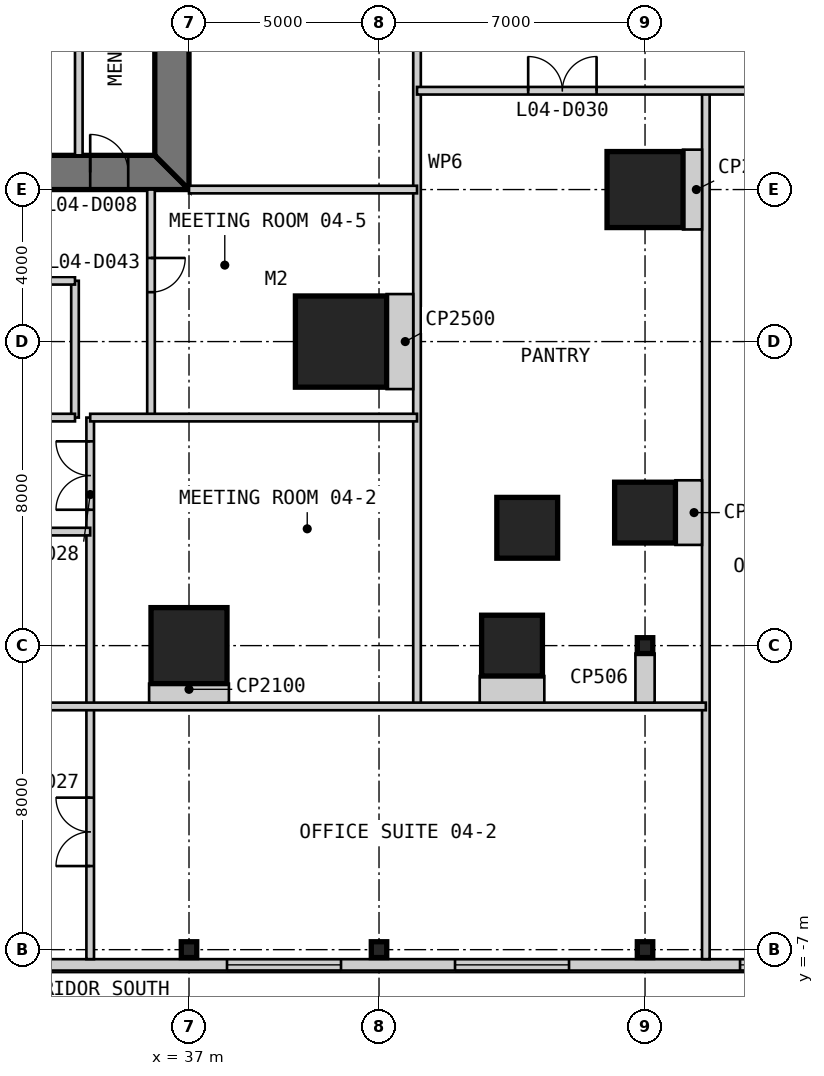
"""IFC4 building model, lengths in metres.
Left out: names, types, materials, properties, quantities, classifications, styles, units other than length and angle.
Written with IfcOpenShell. Run it as: python <this file> out.ifc"""

import sys

from ifc_helpers import new_model, si_unit, direction, frame, frame_2d, origin, origin_2d, place, context, subcontext, project, spatial, polyline, rectangle, i_section, outline, extrude, element, fill, save


model = new_model("IFC4")
c1 = context("Model", 3, precision=1e-05, world=origin(), true_north=direction((0.0, 1.0)))
c2 = subcontext(c1, "Body", "Model", "MODEL_VIEW")
j1 = project(units=[si_unit("LENGTHUNIT", "METRE"), si_unit("PLANEANGLEUNIT", "RADIAN")], contexts=[c1])
p1 = place(None, origin())
s1 = spatial("IfcSite", under=j1, at=p1, CompositionType="ELEMENT")
p2 = place(p1, origin())
s2 = spatial("IfcBuilding", under=s1, at=p2, CompositionType="ELEMENT")
p3 = place(p2, frame((0.0, 0.0, 21.4)))
s3 = spatial("IfcBuildingStorey", under=s2, at=p3, CompositionType="ELEMENT", Elevation=21.4)
p4 = place(p3, frame((41.0, 9.0, 0.0), z_axis=(0.0, 0.0, 1.0), x_axis=(1.0, 0.0, 0.0)))
e1 = element("IfcColumn", 1, at=p4, inside=s3, PredefinedType="COLUMN", context=c2, shape_type="SweptSolid", body=[
    extrude(rectangle(XDim=2.4, YDim=2.4, at=origin_2d()), origin(), (0.0, 0.0, 1.0), 4.8),
])
p5 = place(p3, frame((37.0, 1.0, 0.0), z_axis=(0.0, 0.0, 1.0), x_axis=(1.0, 0.0, 0.0)))
e2 = element("IfcColumn", 2, at=p5, inside=s3, PredefinedType="COLUMN", context=c2, shape_type="SweptSolid", body=[
    extrude(rectangle(XDim=2.0, YDim=2.0, at=origin_2d()), origin(), (0.0, 0.0, 1.0), 4.8),
])
for number, where, z_axis, x_axis in (
    (3, (45.5, 1.0, 0.0), (0.0, 0.0, 1.0), (1.0, 0.0, 0.0)),
    (4, (45.9, 4.1, 0.0), (0.0, 0.0, 1.0), (1.0, 0.0, 0.0)),
    (5, (49.0, 4.5, 0.0), (0.0, 0.0, 1.0), (1.0, 0.0, 0.0)),
):
    element("IfcColumn", number, at=place(p3, frame(where, z_axis=z_axis, x_axis=x_axis)), inside=s3, PredefinedType="COLUMN", context=c2, shape_type="SweptSolid", body=[
        extrude(rectangle(XDim=1.6, YDim=1.6, at=origin_2d()), origin(), (0.0, 0.0, 1.0), 4.8),
    ])
p6 = place(p3, frame((49.0, 13.0, 0.0), z_axis=(0.0, 0.0, 1.0), x_axis=(1.0, 0.0, 0.0)))
e6 = element("IfcColumn", 6, at=p6, inside=s3, PredefinedType="COLUMN", context=c2, shape_type="SweptSolid", body=[
    extrude(rectangle(XDim=2.0, YDim=2.0, at=origin_2d()), origin(), (0.0, 0.0, 1.0), 4.8),
])
for number, where, z_axis, x_axis in (
    (7, (37.0, -7.0, 0.0), (0.0, 0.0, 1.0), (1.0, 0.0, 0.0)),
    (8, (42.0, -7.0, 0.0), (0.0, 0.0, 1.0), (1.0, 0.0, 0.0)),
    (9, (49.0, -7.0, 0.0), (0.0, 0.0, 1.0), (1.0, 0.0, 0.0)),
    (10, (49.0, 1.0, 0.0), (0.0, 0.0, 1.0), (1.0, 0.0, 0.0)),
):
    element("IfcColumn", number, at=place(p3, frame(where, z_axis=z_axis, x_axis=x_axis)), inside=s3, PredefinedType="COLUMN", context=c2, shape_type="SweptSolid", body=[
        extrude(i_section(OverallWidth=0.406, OverallDepth=0.417, WebThickness=0.03, FlangeThickness=0.048, at=origin_2d()), origin(), (0.0, 0.0, 1.0), 4.8),
    ])
p7 = place(p3, frame((13.0, 13.45, 0.0), z_axis=(0.0, 0.0, 1.0), x_axis=(1.0, 0.0, 0.0)))
e11 = element("IfcWall", 11, at=p7, inside=s3, PredefinedType="SHEAR", context=c2, shape_type="SweptSolid", body=[
    extrude(outline(polyline([(0.0, -0.45), (24.0, -0.45), (23.1, 0.45), (0.9, 0.45), (0.0, -0.45)])), origin(), (0.0, 0.0, 1.0), 4.8),
])
p8 = place(p7, frame((4.9, 0.0, 0.0)))
e12 = element("IfcOpeningElement", 12, at=p8, cuts=e11, PredefinedType="OPENING", context=c2, shape_type="SweptSolid", body=[
    extrude(rectangle(XDim=1.0, YDim=2.2, at=frame_2d((0.5, 1.1))), frame((0.0, 0.46, 0.0), z_axis=(0.0, -1.0, 0.0), x_axis=(1.0, 0.0, 0.0)), (0.0, 0.0, 1.0), 0.92),
])
p9 = place(p7, frame((8.9, 0.0, 0.0)))
e13 = element("IfcOpeningElement", 13, at=p9, cuts=e11, PredefinedType="OPENING", context=c2, shape_type="SweptSolid", body=[
    extrude(rectangle(XDim=1.1, YDim=2.2, at=frame_2d((0.55, 1.1))), frame((0.0, 0.46, 0.0), z_axis=(0.0, -1.0, 0.0), x_axis=(1.0, 0.0, 0.0)), (0.0, 0.0, 1.0), 0.92),
])
p10 = place(p7, frame((15.05, 0.0, 0.0)))
e14 = element("IfcOpeningElement", 14, at=p10, cuts=e11, PredefinedType="OPENING", context=c2, shape_type="SweptSolid", body=[
    extrude(rectangle(XDim=0.9, YDim=2.2, at=frame_2d((0.45, 1.1))), frame((0.0, 0.46, 0.0), z_axis=(0.0, -1.0, 0.0), x_axis=(1.0, 0.0, 0.0)), (0.0, 0.0, 1.0), 0.92),
])
p11 = place(p7, frame((17.9, 0.0, 0.0)))
e15 = element("IfcOpeningElement", 15, at=p11, cuts=e11, PredefinedType="OPENING", context=c2, shape_type="SweptSolid", body=[
    extrude(rectangle(XDim=1.0, YDim=2.2, at=frame_2d((0.5, 1.1))), frame((0.0, 0.46, 0.0), z_axis=(0.0, -1.0, 0.0), x_axis=(1.0, 0.0, 0.0)), (0.0, 0.0, 1.0), 0.92),
])
p12 = place(p7, frame((21.4, 0.0, 0.0)))
e16 = element("IfcOpeningElement", 16, at=p12, cuts=e11, PredefinedType="OPENING", context=c2, shape_type="SweptSolid", body=[
    extrude(rectangle(XDim=1.0, YDim=2.2, at=frame_2d((0.5, 1.1))), frame((0.0, 0.46, 0.0), z_axis=(0.0, -1.0, 0.0), x_axis=(1.0, 0.0, 0.0)), (0.0, 0.0, 1.0), 0.92),
])
p13 = place(p3, frame((36.55, 13.9, 0.0), z_axis=(0.0, 0.0, 1.0), x_axis=(0.0, 1.0, 0.0)))
e17 = element("IfcWall", 17, at=p13, inside=s3, PredefinedType="SHEAR", context=c2, shape_type="SweptSolid", body=[
    extrude(outline(polyline([(-0.9, -0.45), (23.1, -0.45), (22.2, 0.45), (0.0, 0.45), (-0.9, -0.45)])), origin(), (0.0, 0.0, 1.0), 4.8),
])
p14 = place(p13, frame((20.2, 0.0, 0.0)))
e18 = element("IfcOpeningElement", 18, at=p14, cuts=e17, PredefinedType="OPENING", context=c2, shape_type="SweptSolid", body=[
    extrude(rectangle(XDim=1.0, YDim=2.2, at=frame_2d((0.5, 1.1))), frame((0.0, 0.46, 0.0), z_axis=(0.0, -1.0, 0.0), x_axis=(1.0, 0.0, 0.0)), (0.0, 0.0, 1.0), 0.92),
])
p15 = place(p13, frame((17.25, 0.0, 0.0)))
e19 = element("IfcOpeningElement", 19, at=p15, cuts=e17, PredefinedType="OPENING", context=c2, shape_type="SweptSolid", body=[
    extrude(rectangle(XDim=0.9, YDim=2.2, at=frame_2d((0.45, 1.1))), frame((0.0, 0.46, 0.0), z_axis=(0.0, -1.0, 0.0), x_axis=(1.0, 0.0, 0.0)), (0.0, 0.0, 1.0), 0.92),
])
p16 = place(p3, frame((-7.55, -7.4, 0.0), z_axis=(0.0, 0.0, 1.0), x_axis=(1.0, 0.0, 0.0)))
e20 = element("IfcWall", 20, at=p16, inside=s3, PredefinedType="SOLIDWALL", context=c2, shape_type="SweptSolid", body=[
    extrude(rectangle(XDim=65.1, YDim=0.3, at=frame_2d((32.55, 0.0))), origin(), (0.0, 0.0, 1.0), 4.5),
])
p17 = place(p16, frame((3.05, 0.0, 0.9)))
e21 = element("IfcOpeningElement", 21, at=p17, cuts=e20, PredefinedType="OPENING", context=c2, shape_type="SweptSolid", body=[
    extrude(rectangle(XDim=3.0, YDim=2.4, at=frame_2d((1.5, 1.2))), frame((0.0, 0.16, 0.0), z_axis=(0.0, -1.0, 0.0), x_axis=(1.0, 0.0, 0.0)), (0.0, 0.0, 1.0), 0.32),
])
p18 = place(p16, frame((11.05, 0.0, 0.9)))
e22 = element("IfcOpeningElement", 22, at=p18, cuts=e20, PredefinedType="OPENING", context=c2, shape_type="SweptSolid", body=[
    extrude(rectangle(XDim=3.0, YDim=2.4, at=frame_2d((1.5, 1.2))), frame((0.0, 0.16, 0.0), z_axis=(0.0, -1.0, 0.0), x_axis=(1.0, 0.0, 0.0)), (0.0, 0.0, 1.0), 0.32),
])
p19 = place(p16, frame((25.05, 0.0, 0.9)))
e23 = element("IfcOpeningElement", 23, at=p19, cuts=e20, PredefinedType="OPENING", context=c2, shape_type="SweptSolid", body=[
    extrude(rectangle(XDim=3.0, YDim=2.4, at=frame_2d((1.5, 1.2))), frame((0.0, 0.16, 0.0), z_axis=(0.0, -1.0, 0.0), x_axis=(1.0, 0.0, 0.0)), (0.0, 0.0, 1.0), 0.32),
])
p20 = place(p16, frame((37.05, 0.0, 0.9)))
e24 = element("IfcOpeningElement", 24, at=p20, cuts=e20, PredefinedType="OPENING", context=c2, shape_type="SweptSolid", body=[
    extrude(rectangle(XDim=3.0, YDim=2.4, at=frame_2d((1.5, 1.2))), frame((0.0, 0.16, 0.0), z_axis=(0.0, -1.0, 0.0), x_axis=(1.0, 0.0, 0.0)), (0.0, 0.0, 1.0), 0.32),
])
p21 = place(p16, frame((45.55, 0.0, 0.9)))
e25 = element("IfcOpeningElement", 25, at=p21, cuts=e20, PredefinedType="OPENING", context=c2, shape_type="SweptSolid", body=[
    extrude(rectangle(XDim=3.0, YDim=2.4, at=frame_2d((1.5, 1.2))), frame((0.0, 0.16, 0.0), z_axis=(0.0, -1.0, 0.0), x_axis=(1.0, 0.0, 0.0)), (0.0, 0.0, 1.0), 0.32),
])
p22 = place(p16, frame((51.55, 0.0, 0.9)))
e26 = element("IfcOpeningElement", 26, at=p22, cuts=e20, PredefinedType="OPENING", context=c2, shape_type="SweptSolid", body=[
    extrude(rectangle(XDim=3.0, YDim=2.4, at=frame_2d((1.5, 1.2))), frame((0.0, 0.16, 0.0), z_axis=(0.0, -1.0, 0.0), x_axis=(1.0, 0.0, 0.0)), (0.0, 0.0, 1.0), 0.32),
])
p23 = place(p16, frame((59.05, 0.0, 0.9)))
e27 = element("IfcOpeningElement", 27, at=p23, cuts=e20, PredefinedType="OPENING", context=c2, shape_type="SweptSolid", body=[
    extrude(rectangle(XDim=3.0, YDim=2.4, at=frame_2d((1.5, 1.2))), frame((0.0, 0.16, 0.0), z_axis=(0.0, -1.0, 0.0), x_axis=(1.0, 0.0, 0.0)), (0.0, 0.0, 1.0), 0.32),
])
p24 = place(p3, frame((34.1, 13.9, 0.0), z_axis=(0.0, 0.0, 1.0), x_axis=(0.0, 1.0, 0.0)))
e28 = element("IfcWall", 28, at=p24, inside=s3, PredefinedType="PARTITIONING", context=c2, shape_type="SweptSolid", body=[
    extrude(rectangle(XDim=6.1, YDim=0.2, at=frame_2d((3.05, 0.0))), origin(), (0.0, 0.0, 1.0), 4.6),
])
p25 = place(p3, frame((34.0, 7.0, 0.0), z_axis=(0.0, 0.0, 1.0), x_axis=(0.0, 1.0, 0.0)))
e29 = element("IfcWall", 29, at=p25, inside=s3, PredefinedType="PARTITIONING", context=c2, shape_type="SweptSolid", body=[
    extrude(rectangle(XDim=3.6, YDim=0.2, at=frame_2d((1.8, 0.0))), origin(), (0.0, 0.0, 1.0), 3.843),
])
p26 = place(p3, frame((34.4, -7.25, 0.0), z_axis=(0.0, 0.0, 1.0), x_axis=(0.0, 1.0, 0.0)))
e30 = element("IfcWall", 30, at=p26, inside=s3, PredefinedType="PARTITIONING", context=c2, shape_type="SweptSolid", body=[
    extrude(rectangle(XDim=14.25, YDim=0.2, at=frame_2d((7.125, 0.0))), origin(), (0.0, 0.0, 1.0), 4.5),
])
p27 = place(p26, frame((2.45, 0.0, 0.0)))
e31 = element("IfcOpeningElement", 31, at=p27, cuts=e30, PredefinedType="OPENING", context=c2, shape_type="SweptSolid", body=[
    extrude(rectangle(XDim=1.8, YDim=2.4, at=frame_2d((0.9, 1.2))), frame((0.0, 0.11, 0.0), z_axis=(0.0, -1.0, 0.0), x_axis=(1.0, 0.0, 0.0)), (0.0, 0.0, 1.0), 0.22),
])
p28 = place(p26, frame((11.825, 0.0, 0.0)))
e32 = element("IfcOpeningElement", 32, at=p28, cuts=e30, PredefinedType="OPENING", context=c2, shape_type="SweptSolid", body=[
    extrude(rectangle(XDim=1.8, YDim=2.4, at=frame_2d((0.9, 1.2))), frame((0.0, 0.11, 0.0), z_axis=(0.0, -1.0, 0.0), x_axis=(1.0, 0.0, 0.0)), (0.0, 0.0, 1.0), 0.22),
])
p29 = place(p3, frame((36.0, 7.0, 0.0), z_axis=(0.0, 0.0, 1.0), x_axis=(0.0, 1.0, 0.0)))
e33 = element("IfcWall", 33, at=p29, inside=s3, PredefinedType="PARTITIONING", context=c2, shape_type="SweptSolid", body=[
    extrude(rectangle(XDim=6.0, YDim=0.2, at=frame_2d((3.0, 0.0))), origin(), (0.0, 0.0, 1.0), 4.5),
])
p30 = place(p29, frame((3.3, 0.0, 0.0)))
e34 = element("IfcOpeningElement", 34, at=p30, cuts=e33, PredefinedType="OPENING", context=c2, shape_type="SweptSolid", body=[
    extrude(rectangle(XDim=0.9, YDim=2.2, at=frame_2d((0.45, 1.1))), frame((0.0, 0.11, 0.0), z_axis=(0.0, -1.0, 0.0), x_axis=(1.0, 0.0, 0.0)), (0.0, 0.0, 1.0), 0.22),
])
p31 = place(p3, frame((43.0, -0.6, 0.0), z_axis=(0.0, 0.0, 1.0), x_axis=(0.0, 1.0, 0.0)))
e35 = element("IfcWall", 35, at=p31, inside=s3, PredefinedType="PARTITIONING", context=c2, shape_type="SweptSolid", body=[
    extrude(rectangle(XDim=28.6, YDim=0.2, at=frame_2d((14.3, 0.0))), origin(), (0.0, 0.0, 1.0), 3.843),
])
p32 = place(p3, frame((50.6, -7.25, 0.0), z_axis=(0.0, 0.0, 1.0), x_axis=(0.0, 1.0, 0.0)))
e36 = element("IfcWall", 36, at=p32, inside=s3, PredefinedType="PARTITIONING", context=c2, shape_type="SweptSolid", body=[
    extrude(rectangle(XDim=22.85, YDim=0.2, at=frame_2d((11.425, 0.0))), origin(), (0.0, 0.0, 1.0), 4.5),
])
p33 = place(p3, frame((26.4, -0.6, 0.0), z_axis=(0.0, 0.0, 1.0), x_axis=(1.0, 0.0, 0.0)))
e37 = element("IfcWall", 37, at=p33, inside=s3, PredefinedType="PARTITIONING", context=c2, shape_type="SweptSolid", body=[
    extrude(rectangle(XDim=24.2, YDim=0.2, at=frame_2d((12.1, 0.0))), origin(), (0.0, 0.0, 1.0), 4.5),
])
p34 = place(p3, frame((26.4, 4.0, 0.0), z_axis=(0.0, 0.0, 1.0), x_axis=(1.0, 0.0, 0.0)))
e38 = element("IfcWall", 38, at=p34, inside=s3, PredefinedType="PARTITIONING", context=c2, shape_type="SweptSolid", body=[
    extrude(rectangle(XDim=8.0, YDim=0.2, at=frame_2d((4.0, 0.0))), origin(), (0.0, 0.0, 1.0), 4.5),
])
p35 = place(p34, frame((3.55, 0.0, 0.0)))
e39 = element("IfcOpeningElement", 39, at=p35, cuts=e38, PredefinedType="OPENING", context=c2, shape_type="SweptSolid", body=[
    extrude(rectangle(XDim=0.9, YDim=2.2, at=frame_2d((0.45, 1.1))), frame((0.0, 0.11, 0.0), z_axis=(0.0, -1.0, 0.0), x_axis=(1.0, 0.0, 0.0)), (0.0, 0.0, 1.0), 0.22),
])
p36 = place(p3, frame((25.6, 7.0, 0.0), z_axis=(0.0, 0.0, 1.0), x_axis=(1.0, 0.0, 0.0)))
e40 = element("IfcWall", 40, at=p36, inside=s3, PredefinedType="PARTITIONING", context=c2, shape_type="SweptSolid", body=[
    extrude(rectangle(XDim=8.4, YDim=0.2, at=frame_2d((4.2, 0.0))), origin(), (0.0, 0.0, 1.0), 4.5),
])
p37 = place(p3, frame((34.4, 7.0, 0.0), z_axis=(0.0, 0.0, 1.0), x_axis=(1.0, 0.0, 0.0)))
e41 = element("IfcWall", 41, at=p37, inside=s3, PredefinedType="PARTITIONING", context=c2, shape_type="SweptSolid", body=[
    extrude(rectangle(XDim=8.6, YDim=0.2, at=frame_2d((4.3, 0.0))), origin(), (0.0, 0.0, 1.0), 4.5),
])
p38 = place(p3, frame((25.6, 10.6, 0.0), z_axis=(0.0, 0.0, 1.0), x_axis=(1.0, 0.0, 0.0)))
e42 = element("IfcWall", 42, at=p38, inside=s3, PredefinedType="PARTITIONING", context=c2, shape_type="SweptSolid", body=[
    extrude(rectangle(XDim=8.4, YDim=0.2, at=frame_2d((4.2, 0.0))), origin(), (0.0, 0.0, 1.0), 4.5),
])
p39 = place(p38, frame((3.75, 0.0, 0.0)))
e43 = element("IfcOpeningElement", 43, at=p39, cuts=e42, PredefinedType="OPENING", context=c2, shape_type="SweptSolid", body=[
    extrude(rectangle(XDim=0.9, YDim=2.2, at=frame_2d((0.45, 1.1))), frame((0.0, 0.11, 0.0), z_axis=(0.0, -1.0, 0.0), x_axis=(1.0, 0.0, 0.0)), (0.0, 0.0, 1.0), 0.22),
])
p40 = place(p3, frame((37.0, 13.0, 0.0), z_axis=(0.0, 0.0, 1.0), x_axis=(1.0, 0.0, 0.0)))
e44 = element("IfcWall", 44, at=p40, inside=s3, PredefinedType="PARTITIONING", context=c2, shape_type="SweptSolid", body=[
    extrude(rectangle(XDim=6.0, YDim=0.2, at=frame_2d((3.0, 0.0))), origin(), (0.0, 0.0, 1.0), 3.653),
])
p41 = place(p3, frame((43.0, 15.6, 0.0), z_axis=(0.0, 0.0, 1.0), x_axis=(1.0, 0.0, 0.0)))
e45 = element("IfcWall", 45, at=p41, inside=s3, PredefinedType="PARTITIONING", context=c2, shape_type="SweptSolid", body=[
    extrude(rectangle(XDim=14.25, YDim=0.2, at=frame_2d((7.125, 0.0))), origin(), (0.0, 0.0, 1.0), 4.5),
])
p42 = place(p41, frame((10.0, 0.0, 0.0)))
e46 = element("IfcOpeningElement", 46, at=p42, cuts=e45, PredefinedType="OPENING", context=c2, shape_type="SweptSolid", body=[
    extrude(rectangle(XDim=1.8, YDim=2.4, at=frame_2d((0.9, 1.2))), frame((0.0, 0.11, 0.0), z_axis=(0.0, -1.0, 0.0), x_axis=(1.0, 0.0, 0.0)), (0.0, 0.0, 1.0), 0.22),
])
p43 = place(p41, frame((2.925, 0.0, 0.0)))
e47 = element("IfcOpeningElement", 47, at=p43, cuts=e45, PredefinedType="OPENING", context=c2, shape_type="SweptSolid", body=[
    extrude(rectangle(XDim=1.8, YDim=2.4, at=frame_2d((0.9, 1.2))), frame((0.0, 0.11, 0.0), z_axis=(0.0, -1.0, 0.0), x_axis=(1.0, 0.0, 0.0)), (0.0, 0.0, 1.0), 0.22),
])
p44 = place(p3, frame((37.0, -0.5, 0.0), z_axis=(0.0, 0.0, 1.0), x_axis=(0.0, 1.0, 0.0)))
e48 = element("IfcWall", 48, at=p44, inside=s3, PredefinedType="PARTITIONING", context=c2, shape_type="SweptSolid", body=[
    extrude(rectangle(XDim=0.5, YDim=2.1, at=frame_2d((0.25, 0.0))), origin(), (0.0, 0.0, 1.0), 4.5),
])
for number, where, z_axis, x_axis in (
    (49, (45.5, -0.5, 0.0), (0.0, 0.0, 1.0), (0.0, 1.0, 0.0)),
    (50, (50.5, 4.5, 0.0), (0.0, 0.0, 1.0), (-1.0, 0.0, 0.0)),
):
    element("IfcWall", number, at=place(p3, frame(where, z_axis=z_axis, x_axis=x_axis)), inside=s3, PredefinedType="PARTITIONING", context=c2, shape_type="SweptSolid", body=[
        extrude(rectangle(XDim=0.7, YDim=1.7, at=frame_2d((0.35, 0.0))), origin(), (0.0, 0.0, 1.0), 4.5),
    ])
p45 = place(p3, frame((50.5, 13.0, 0.0), z_axis=(0.0, 0.0, 1.0), x_axis=(-1.0, 0.0, 0.0)))
e51 = element("IfcWall", 51, at=p45, inside=s3, PredefinedType="PARTITIONING", context=c2, shape_type="SweptSolid", body=[
    extrude(rectangle(XDim=0.5, YDim=2.1, at=frame_2d((0.25, 0.0))), origin(), (0.0, 0.0, 1.0), 4.5),
])
p46 = place(p3, frame((49.0, -0.5, 0.0), z_axis=(0.0, 0.0, 1.0), x_axis=(0.0, 1.0, 0.0)))
e52 = element("IfcWall", 52, at=p46, inside=s3, PredefinedType="PARTITIONING", context=c2, shape_type="SweptSolid", body=[
    extrude(rectangle(XDim=1.292, YDim=0.506, at=frame_2d((0.646, 0.0))), origin(), (0.0, 0.0, 1.0), 3.754),
])
p47 = place(p3, frame((42.9, 9.0, 0.0), z_axis=(0.0, 0.0, 1.0), x_axis=(-1.0, 0.0, 0.0)))
e53 = element("IfcWall", 53, at=p47, inside=s3, PredefinedType="PARTITIONING", context=c2, shape_type="SweptSolid", body=[
    extrude(rectangle(XDim=0.7, YDim=2.5, at=frame_2d((0.35, 0.0))), origin(), (0.0, 0.0, 1.0), 4.5),
])
p48 = place(p21, origin())
e54 = element("IfcWindow", 54, at=p48, inside=s3, PartitioningType="SINGLE_PANEL", PredefinedType="WINDOW", context=c2, shape_type="SweptSolid", body=[
    extrude(rectangle(XDim=3.0, YDim=2.4, at=frame_2d((1.5, 1.2))), frame((0.0, 0.03, 0.0), z_axis=(0.0, -1.0, 0.0), x_axis=(1.0, 0.0, 0.0)), (0.0, 0.0, 1.0), 0.06),
])
fill(e25, e54)
p49 = place(p22, origin())
e55 = element("IfcWindow", 55, at=p49, inside=s3, PartitioningType="SINGLE_PANEL", PredefinedType="WINDOW", context=c2, shape_type="SweptSolid", body=[
    extrude(rectangle(XDim=3.0, YDim=2.4, at=frame_2d((1.5, 1.2))), frame((0.0, 0.03, 0.0), z_axis=(0.0, -1.0, 0.0), x_axis=(1.0, 0.0, 0.0)), (0.0, 0.0, 1.0), 0.06),
])
fill(e26, e55)
p50 = place(p23, origin())
e56 = element("IfcWindow", 56, at=p50, inside=s3, PartitioningType="SINGLE_PANEL", PredefinedType="WINDOW", context=c2, shape_type="SweptSolid", body=[
    extrude(rectangle(XDim=3.0, YDim=2.4, at=frame_2d((1.5, 1.2))), frame((0.0, 0.03, 0.0), z_axis=(0.0, -1.0, 0.0), x_axis=(1.0, 0.0, 0.0)), (0.0, 0.0, 1.0), 0.06),
])
fill(e27, e56)
p51 = place(p12, origin())
e57 = element("IfcDoor", 57, at=p51, inside=s3, OperationType="SINGLE_SWING_LEFT", PredefinedType="DOOR", context=c2, shape_type="SweptSolid", body=[
    extrude(rectangle(XDim=1.0, YDim=2.2, at=frame_2d((0.5, 1.1))), frame((0.0, 0.025, 0.0), z_axis=(0.0, -1.0, 0.0), x_axis=(1.0, 0.0, 0.0)), (0.0, 0.0, 1.0), 0.05),
    extrude(outline(polyline([(0.0, 0.0), (0.04, 0.0), (0.04, 2.16), (0.96, 2.16), (0.96, 0.0), (1.0, 0.0), (1.0, 2.2), (0.0, 2.2), (0.0, 0.0)])), frame((0.0, 0.3, 0.0), z_axis=(0.0, -1.0, 0.0), x_axis=(1.0, 0.0, 0.0)), (0.0, 0.0, 1.0), 0.6),
])
fill(e16, e57)
p52 = place(p27, origin())
e58 = element("IfcDoor", 58, at=p52, inside=s3, OperationType="DOUBLE_DOOR_SINGLE_SWING", PredefinedType="DOOR", context=c2, shape_type="SweptSolid", body=[
    extrude(rectangle(XDim=1.8, YDim=2.4, at=frame_2d((0.9, 1.2))), frame((0.0, 0.025, 0.0), z_axis=(0.0, -1.0, 0.0), x_axis=(1.0, 0.0, 0.0)), (0.0, 0.0, 1.0), 0.05),
])
fill(e31, e58)
p53 = place(p28, origin())
e59 = element("IfcDoor", 59, at=p53, inside=s3, OperationType="DOUBLE_DOOR_SINGLE_SWING", PredefinedType="DOOR", context=c2, shape_type="SweptSolid", body=[
    extrude(rectangle(XDim=1.8, YDim=2.4, at=frame_2d((0.9, 1.2))), frame((0.0, 0.025, 0.0), z_axis=(0.0, -1.0, 0.0), x_axis=(1.0, 0.0, 0.0)), (0.0, 0.0, 1.0), 0.05),
])
fill(e32, e59)
p54 = place(p43, origin())
e60 = element("IfcDoor", 60, at=p54, inside=s3, OperationType="DOUBLE_DOOR_SINGLE_SWING", PredefinedType="DOOR", context=c2, shape_type="SweptSolid", body=[
    extrude(rectangle(XDim=1.8, YDim=2.4, at=frame_2d((0.9, 1.2))), frame((0.0, 0.025, 0.0), z_axis=(0.0, -1.0, 0.0), x_axis=(1.0, 0.0, 0.0)), (0.0, 0.0, 1.0), 0.05),
])
fill(e47, e60)
p55 = place(p30, frame((0.9, 0.0, 0.0), z_axis=(0.0, 0.0, 1.0), x_axis=(-1.0, 0.0, 0.0)))
e61 = element("IfcDoor", 61, at=p55, inside=s3, OperationType="SINGLE_SWING_LEFT", PredefinedType="DOOR", context=c2, shape_type="SweptSolid", body=[
    extrude(rectangle(XDim=0.9, YDim=2.2, at=frame_2d((0.45, 1.1))), frame((0.0, 0.025, 0.0), z_axis=(0.0, -1.0, 0.0), x_axis=(1.0, 0.0, 0.0)), (0.0, 0.0, 1.0), 0.05),
])
fill(e34, e61)
save(model, sys.argv[1])
